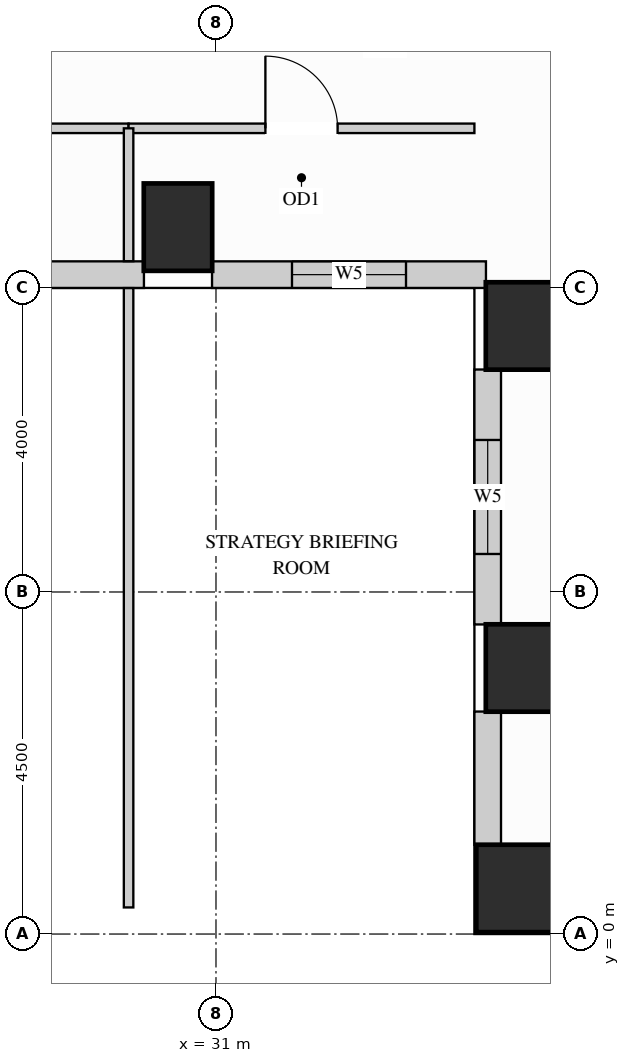
"""IFC4 building model, lengths in metres.
Left out: names, types, materials, properties, quantities, classifications, styles, units other than length and angle.
Written with IfcOpenShell. Run it as: python <this file> out.ifc"""

import sys

from ifc_helpers import new_model, si_unit, direction, frame, frame_2d, origin, origin_2d, place, context, subcontext, project, spatial, rectangle, extrude, source, transform, mapped, element, fill, save


model = new_model("IFC4")
c1 = context("Model", 3, precision=1e-05, world=origin(), true_north=direction((0.0, 1.0)))
c2 = subcontext(c1, "Body", "Model", "MODEL_VIEW")
j1 = project(units=[si_unit("LENGTHUNIT", "METRE"), si_unit("PLANEANGLEUNIT", "RADIAN")], contexts=[c1])
p1 = place(None, origin())
s1 = spatial("IfcSite", under=j1, at=p1, CompositionType="ELEMENT")
p2 = place(p1, origin())
s2 = spatial("IfcBuilding", under=s1, at=p2, CompositionType="ELEMENT")
p3 = place(p2, frame((0.0, 0.0, 113.4)))
s3 = spatial("IfcBuildingStorey", under=s2, at=p3, CompositionType="ELEMENT", Elevation=113.4)
m1 = source(origin(), c2, "Body", "SweptSolid", [
    extrude(rectangle(XDim=0.9, YDim=1.15, at=origin_2d()), origin(), (0.0, 0.0, 1.0), 3.38),
])
for number, where, z_axis, x_axis in (
    (1, (35.0, 3.5, 0.0), (0.0, 0.0, 1.0), (1.0, 0.0, 0.0)),
    (2, (35.0, 8.0, 0.0), (0.0, 0.0, 1.0), (1.0, 0.0, 0.0)),
    (3, (30.5, 9.3, 0.0), (0.0, 0.0, 1.0), (1.0, 0.0, 0.0)),
):
    element("IfcColumn", number, at=place(p3, frame(where, z_axis=z_axis, x_axis=x_axis)), inside=s3, PredefinedType="COLUMN", context=c2, shape_type="MappedRepresentation", body=[
        mapped(m1, transform((0.0, 0.0, 0.0), x_axis=(1.0, 0.0, 0.0), y_axis=(0.0, 1.0, 0.0), z_axis=(0.0, 0.0, 1.0))),
    ])
m2 = source(origin(), c2, "Body", "SweptSolid", [
    extrude(rectangle(XDim=1.15, YDim=1.15, at=origin_2d()), origin(), (0.0, 0.0, 1.0), 3.38),
])
p4 = place(p3, frame((35.0, 0.6, 0.0), z_axis=(0.0, 0.0, 1.0), x_axis=(1.0, 0.0, 0.0)))
e4 = element("IfcColumn", 4, at=p4, inside=s3, PredefinedType="COLUMN", context=c2, shape_type="MappedRepresentation", body=[
    mapped(m2, transform((0.0, 0.0, 0.0), x_axis=(1.0, 0.0, 0.0), y_axis=(0.0, 1.0, 0.0), z_axis=(0.0, 0.0, 1.0))),
])
p5 = place(p3, frame((23.848, 8.675, 0.0), z_axis=(0.0, 0.0, 1.0), x_axis=(1.0, 0.0, 0.0)))
e5 = element("IfcWall", 5, at=p5, inside=s3, PredefinedType="SOLIDWALL", context=c2, shape_type="SweptSolid", body=[
    extrude(rectangle(XDim=6.204, YDim=0.35, at=frame_2d((3.102, 0.0))), origin(), (0.0, 0.0, 1.0), 3.365),
])
p6 = place(p5, frame((1.131, 0.0, 0.78)))
e6 = element("IfcOpeningElement", 6, at=p6, cuts=e5, PredefinedType="OPENING", context=c2, shape_type="SweptSolid", body=[
    extrude(rectangle(XDim=1.5, YDim=2.0, at=frame_2d((0.75, 1.0))), frame((0.0, 0.185, 0.0), z_axis=(0.0, -1.0, 0.0), x_axis=(1.0, 0.0, 0.0)), (0.0, 0.0, 1.0), 0.37),
])
p7 = place(p5, frame((3.441, 0.0, 0.78)))
e7 = element("IfcOpeningElement", 7, at=p7, cuts=e5, PredefinedType="OPENING", context=c2, shape_type="SweptSolid", body=[
    extrude(rectangle(XDim=1.5, YDim=2.0, at=frame_2d((0.75, 1.0))), frame((0.0, 0.185, 0.0), z_axis=(0.0, -1.0, 0.0), x_axis=(1.0, 0.0, 0.0)), (0.0, 0.0, 1.0), 0.37),
])
p8 = place(p3, frame((30.948, 8.675, 0.0), z_axis=(0.0, 0.0, 1.0), x_axis=(1.0, 0.0, 0.0)))
e8 = element("IfcWall", 8, at=p8, inside=s3, PredefinedType="SOLIDWALL", context=c2, shape_type="SweptSolid", body=[
    extrude(rectangle(XDim=3.604, YDim=0.35, at=frame_2d((1.802, 0.0))), origin(), (0.0, 0.0, 1.0), 3.365),
])
p9 = place(p8, frame((1.052, 0.0, 0.78)))
e9 = element("IfcOpeningElement", 9, at=p9, cuts=e8, PredefinedType="OPENING", context=c2, shape_type="SweptSolid", body=[
    extrude(rectangle(XDim=1.5, YDim=2.0, at=frame_2d((0.75, 1.0))), frame((0.0, 0.185, 0.0), z_axis=(0.0, -1.0, 0.0), x_axis=(1.0, 0.0, 0.0)), (0.0, 0.0, 1.0), 0.37),
])
p10 = place(p3, frame((34.575, 7.427, 0.0), z_axis=(0.0, 0.0, 1.0), x_axis=(0.0, -1.0, 0.0)))
e10 = element("IfcWall", 10, at=p10, inside=s3, PredefinedType="SOLIDWALL", context=c2, shape_type="SweptSolid", body=[
    extrude(rectangle(XDim=3.354, YDim=0.35, at=frame_2d((1.677, 0.0))), origin(), (0.0, 0.0, 1.0), 3.365),
])
p11 = place(p10, frame((0.927, 0.0, 0.78)))
e11 = element("IfcOpeningElement", 11, at=p11, cuts=e10, PredefinedType="OPENING", context=c2, shape_type="SweptSolid", body=[
    extrude(rectangle(XDim=1.5, YDim=2.0, at=frame_2d((0.75, 1.0))), frame((0.0, 0.185, 0.0), z_axis=(0.0, -1.0, 0.0), x_axis=(1.0, 0.0, 0.0)), (0.0, 0.0, 1.0), 0.37),
])
m3 = source(origin(), c2, "Body", "SweptSolid", [
    extrude(rectangle(XDim=1.754, YDim=0.35, at=frame_2d((0.877, 0.0))), origin(), (0.0, 0.0, 1.0), 3.365),
])
p12 = place(p3, frame((34.575, 2.927, 0.0), z_axis=(0.0, 0.0, 1.0), x_axis=(0.0, -1.0, 0.0)))
e12 = element("IfcWall", 12, at=p12, inside=s3, PredefinedType="SOLIDWALL", context=c2, shape_type="MappedRepresentation", body=[
    mapped(m3, transform((0.0, 0.0, 0.0), x_axis=(1.0, 0.0, 0.0), y_axis=(0.0, 1.0, 0.0), z_axis=(0.0, 0.0, 1.0))),
])
p13 = place(p3, frame((23.85, 10.6, 0.0), z_axis=(0.0, 0.0, 1.0), x_axis=(1.0, 0.0, 0.0)))
e13 = element("IfcWall", 13, at=p13, inside=s3, PredefinedType="PARTITIONING", context=c2, shape_type="SweptSolid", body=[
    extrude(rectangle(XDim=6.0, YDim=0.125, at=frame_2d((3.0, 0.0))), origin(), (0.0, 0.0, 1.0), 3.365),
])
p14 = place(p13, frame((2.525, 0.0, 0.0)))
e14 = element("IfcOpeningElement", 14, at=p14, cuts=e13, PredefinedType="OPENING", context=c2, shape_type="SweptSolid", body=[
    extrude(rectangle(XDim=0.95, YDim=2.15, at=frame_2d((0.475, 1.075))), frame((0.0, 0.073, 0.0), z_axis=(0.0, -1.0, 0.0), x_axis=(1.0, 0.0, 0.0)), (0.0, 0.0, 1.0), 0.145),
])
p15 = place(p3, frame((29.85, 10.6, 0.0), z_axis=(0.0, 0.0, 1.0), x_axis=(1.0, 0.0, 0.0)))
e15 = element("IfcWall", 15, at=p15, inside=s3, PredefinedType="PARTITIONING", context=c2, shape_type="SweptSolid", body=[
    extrude(rectangle(XDim=4.55, YDim=0.125, at=frame_2d((2.275, 0.0))), origin(), (0.0, 0.0, 1.0), 3.365),
])
p16 = place(p15, frame((1.8, 0.0, 0.0)))
e16 = element("IfcOpeningElement", 16, at=p16, cuts=e15, PredefinedType="OPENING", context=c2, shape_type="SweptSolid", body=[
    extrude(rectangle(XDim=0.95, YDim=2.15, at=frame_2d((0.475, 1.075))), frame((0.0, 0.073, 0.0), z_axis=(0.0, -1.0, 0.0), x_axis=(1.0, 0.0, 0.0)), (0.0, 0.0, 1.0), 0.145),
])
m4 = source(origin(), c2, "Body", "SweptSolid", [
    extrude(rectangle(XDim=8.148, YDim=0.125, at=frame_2d((4.074, 0.0))), origin(), (0.0, 0.0, 1.0), 3.365),
])
p17 = place(p3, frame((29.85, 0.35, 0.0), z_axis=(0.0, 0.0, 1.0), x_axis=(0.0, 1.0, 0.0)))
e17 = element("IfcWall", 17, at=p17, inside=s3, PredefinedType="PARTITIONING", context=c2, shape_type="MappedRepresentation", body=[
    mapped(m4, transform((0.0, 0.0, 0.0), x_axis=(1.0, 0.0, 0.0), y_axis=(0.0, 1.0, 0.0), z_axis=(0.0, 0.0, 1.0))),
])
m5 = source(origin(), c2, "Body", "SweptSolid", [
    extrude(rectangle(XDim=1.748, YDim=0.125, at=frame_2d((0.874, 0.0))), origin(), (0.0, 0.0, 1.0), 3.365),
])
p18 = place(p3, frame((29.85, 8.852, 0.0), z_axis=(0.0, 0.0, 1.0), x_axis=(0.0, 1.0, 0.0)))
e18 = element("IfcWall", 18, at=p18, inside=s3, PredefinedType="PARTITIONING", context=c2, shape_type="MappedRepresentation", body=[
    mapped(m5, transform((0.0, 0.0, 0.0), x_axis=(1.0, 0.0, 0.0), y_axis=(0.0, 1.0, 0.0), z_axis=(0.0, 0.0, 1.0))),
])
m6 = source(origin(), c2, "Body", "SweptSolid", [
    extrude(rectangle(XDim=0.95, YDim=2.15, at=frame_2d((0.475, 1.075))), frame((0.0, 0.025, 0.0), z_axis=(0.0, -1.0, 0.0), x_axis=(1.0, 0.0, 0.0)), (0.0, 0.0, 1.0), 0.05),
])
p19 = place(p16, origin())
e19 = element("IfcDoor", 19, at=p19, inside=s3, OperationType="SINGLE_SWING_LEFT", PredefinedType="DOOR", context=c2, shape_type="MappedRepresentation", body=[
    mapped(m6, transform((0.0, 0.0, 0.0), x_axis=(1.0, 0.0, 0.0), y_axis=(0.0, 1.0, 0.0), z_axis=(0.0, 0.0, 1.0))),
])
fill(e16, e19)
m7 = source(origin(), c2, "Body", "SweptSolid", [
    extrude(rectangle(XDim=1.5, YDim=2.0, at=frame_2d((0.75, 1.0))), frame((0.0, 0.03, 0.0), z_axis=(0.0, -1.0, 0.0), x_axis=(1.0, 0.0, 0.0)), (0.0, 0.0, 1.0), 0.06),
])
p20 = place(p9, origin())
e20 = element("IfcWindow", 20, at=p20, inside=s3, PartitioningType="SINGLE_PANEL", PredefinedType="WINDOW", context=c2, shape_type="MappedRepresentation", body=[
    mapped(m7, transform((0.0, 0.0, 0.0), x_axis=(1.0, 0.0, 0.0), y_axis=(0.0, 1.0, 0.0), z_axis=(0.0, 0.0, 1.0))),
])
fill(e9, e20)
p21 = place(p11, origin())
e21 = element("IfcWindow", 21, at=p21, inside=s3, PartitioningType="SINGLE_PANEL", PredefinedType="WINDOW", context=c2, shape_type="MappedRepresentation", body=[
    mapped(m7, transform((0.0, 0.0, 0.0), x_axis=(1.0, 0.0, 0.0), y_axis=(0.0, 1.0, 0.0), z_axis=(0.0, 0.0, 1.0))),
])
fill(e11, e21)
save(model, sys.argv[1])
